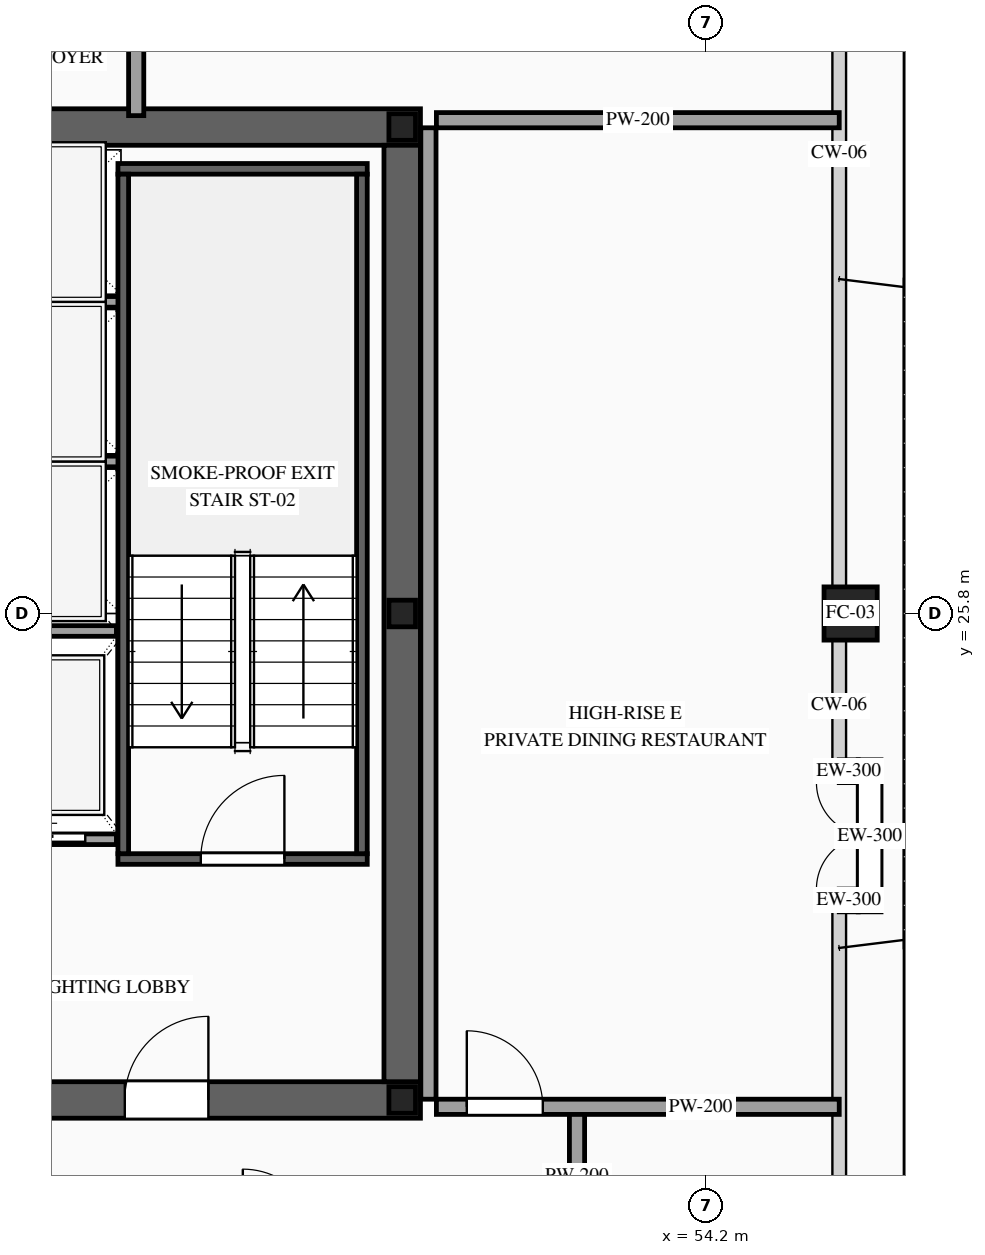
"""IFC4 building model, lengths in metres.
Left out: names, types, materials, properties, quantities, classifications, styles, units other than length and angle.
Written with IfcOpenShell. Run it as: python <this file> out.ifc"""

import sys

from ifc_helpers import new_model, si_unit, direction, frame, frame_2d, origin, origin_2d, place, context, subcontext, project, spatial, rectangle, hollow_rectangle, i_section, extrude, source, transform, mapped, element, fill, save


model = new_model("IFC4")
c1 = context("Model", 3, precision=1e-05, world=origin(), true_north=direction((0.0, 1.0)))
c2 = subcontext(c1, "Body", "Model", "MODEL_VIEW")
j1 = project(units=[si_unit("LENGTHUNIT", "METRE"), si_unit("PLANEANGLEUNIT", "RADIAN")], contexts=[c1])
p1 = place(None, origin())
s1 = spatial("IfcSite", under=j1, at=p1, CompositionType="ELEMENT")
p2 = place(p1, origin())
s2 = spatial("IfcBuilding", under=s1, at=p2, CompositionType="ELEMENT")
p3 = place(p2, frame((0.0, 0.0, 335.7)))
s3 = spatial("IfcBuildingStorey", under=s2, at=p3, CompositionType="ELEMENT", Elevation=335.7)
p4 = place(p3, frame((23.56, 19.4, 0.0), z_axis=(0.0, 0.0, 1.0), x_axis=(1.0, 0.0, 0.0)))
e1 = element("IfcWall", 1, at=p4, inside=s3, PredefinedType="SHEAR", context=c2, shape_type="SweptSolid", body=[
    extrude(rectangle(XDim=26.88, YDim=0.48, at=frame_2d((13.44, 0.0))), origin(), (0.0, 0.0, 1.0), 3.5),
])
p5 = place(p4, frame((1.89, 0.0, 0.0)))
e2 = element("IfcOpeningElement", 2, at=p5, cuts=e1, PredefinedType="OPENING", context=c2, shape_type="SweptSolid", body=[
    extrude(rectangle(XDim=1.1, YDim=2.2, at=frame_2d((0.55, 1.1))), frame((0.0, 0.255, 0.0), z_axis=(0.0, -1.0, 0.0), x_axis=(1.0, 0.0, 0.0)), (0.0, 0.0, 1.0), 0.51),
])
p6 = place(p4, frame((9.79, 0.0, 0.0)))
e3 = element("IfcOpeningElement", 3, at=p6, cuts=e1, PredefinedType="OPENING", context=c2, shape_type="SweptSolid", body=[
    extrude(rectangle(XDim=1.1, YDim=2.2, at=frame_2d((0.55, 1.1))), frame((0.0, 0.255, 0.0), z_axis=(0.0, -1.0, 0.0), x_axis=(1.0, 0.0, 0.0)), (0.0, 0.0, 1.0), 0.51),
])
p7 = place(p4, frame((22.99, 0.0, 0.0)))
e4 = element("IfcOpeningElement", 4, at=p7, cuts=e1, PredefinedType="OPENING", context=c2, shape_type="SweptSolid", body=[
    extrude(rectangle(XDim=1.1, YDim=2.2, at=frame_2d((0.55, 1.1))), frame((0.0, 0.255, 0.0), z_axis=(0.0, -1.0, 0.0), x_axis=(1.0, 0.0, 0.0)), (0.0, 0.0, 1.0), 0.51),
])
p8 = place(p4, frame((19.61, 0.0, 0.0)))
e5 = element("IfcOpeningElement", 5, at=p8, cuts=e1, PredefinedType="OPENING", context=c2, shape_type="SweptSolid", body=[
    extrude(rectangle(XDim=0.9, YDim=2.15, at=frame_2d((0.45, 1.075))), frame((0.0, 0.255, 0.0), z_axis=(0.0, -1.0, 0.0), x_axis=(1.0, 0.0, 0.0)), (0.0, 0.0, 1.0), 0.51),
])
p9 = place(p4, frame((18.17, 0.0, 0.0)))
e6 = element("IfcOpeningElement", 6, at=p9, cuts=e1, PredefinedType="OPENING", context=c2, shape_type="SweptSolid", body=[
    extrude(rectangle(XDim=0.9, YDim=2.15, at=frame_2d((0.45, 1.075))), frame((0.0, 0.255, 0.0), z_axis=(0.0, -1.0, 0.0), x_axis=(1.0, 0.0, 0.0)), (0.0, 0.0, 1.0), 0.51),
])
p10 = place(p3, frame((23.56, 32.2, 0.0), z_axis=(0.0, 0.0, 1.0), x_axis=(1.0, 0.0, 0.0)))
e7 = element("IfcWall", 7, at=p10, inside=s3, PredefinedType="SHEAR", context=c2, shape_type="SweptSolid", body=[
    extrude(rectangle(XDim=26.88, YDim=0.48, at=frame_2d((13.44, 0.0))), origin(), (0.0, 0.0, 1.0), 3.5),
])
p11 = place(p10, frame((4.51, 0.0, 0.0)))
e8 = element("IfcOpeningElement", 8, at=p11, cuts=e7, PredefinedType="OPENING", context=c2, shape_type="SweptSolid", body=[
    extrude(rectangle(XDim=0.9, YDim=2.15, at=frame_2d((0.45, 1.075))), frame((0.0, 0.255, 0.0), z_axis=(0.0, -1.0, 0.0), x_axis=(1.0, 0.0, 0.0)), (0.0, 0.0, 1.0), 0.51),
])
p12 = place(p10, frame((9.79, 0.0, 0.0)))
e9 = element("IfcOpeningElement", 9, at=p12, cuts=e7, PredefinedType="OPENING", context=c2, shape_type="SweptSolid", body=[
    extrude(rectangle(XDim=1.1, YDim=2.2, at=frame_2d((0.55, 1.1))), frame((0.0, 0.255, 0.0), z_axis=(0.0, -1.0, 0.0), x_axis=(1.0, 0.0, 0.0)), (0.0, 0.0, 1.0), 0.51),
])
p13 = place(p10, frame((15.64, 0.0, 0.0)))
e10 = element("IfcOpeningElement", 10, at=p13, cuts=e7, PredefinedType="OPENING", context=c2, shape_type="SweptSolid", body=[
    extrude(rectangle(XDim=1.1, YDim=2.2, at=frame_2d((0.55, 1.1))), frame((0.0, 0.255, 0.0), z_axis=(0.0, -1.0, 0.0), x_axis=(1.0, 0.0, 0.0)), (0.0, 0.0, 1.0), 0.51),
])
p14 = place(p10, frame((18.74, 0.0, 0.0)))
e11 = element("IfcOpeningElement", 11, at=p14, cuts=e7, PredefinedType="OPENING", context=c2, shape_type="SweptSolid", body=[
    extrude(rectangle(XDim=1.1, YDim=2.2, at=frame_2d((0.55, 1.1))), frame((0.0, 0.255, 0.0), z_axis=(0.0, -1.0, 0.0), x_axis=(1.0, 0.0, 0.0)), (0.0, 0.0, 1.0), 0.51),
])
m1 = source(origin(), c2, "Body", "SweptSolid", [
    extrude(rectangle(XDim=12.32, YDim=0.48, at=frame_2d((6.16, 0.0))), origin(), (0.0, 0.0, 1.0), 3.5),
])
p15 = place(p3, frame((50.2, 19.64, 0.0), z_axis=(0.0, 0.0, 1.0), x_axis=(0.0, 1.0, 0.0)))
e12 = element("IfcWall", 12, at=p15, inside=s3, PredefinedType="SHEAR", context=c2, shape_type="MappedRepresentation", body=[
    mapped(m1, transform((0.0, 0.0, 0.0), scale=1.0)),
])
m2 = source(origin(), c2, "Body", "SweptSolid", [
    extrude(i_section(OverallWidth=0.35, OverallDepth=0.35, WebThickness=0.012, FlangeThickness=0.019, at=origin_2d()), origin(), (0.0, 0.0, 1.0), 3.5),
])
for number, where, z_axis, x_axis in (
    (13, (50.2, 19.4, 0.0), (0.0, 0.0, 1.0), (1.0, 0.0, 0.0)),
    (14, (50.2, 25.8, 0.0), (0.0, 0.0, 1.0), (1.0, 0.0, 0.0)),
    (15, (50.2, 32.2, 0.0), (0.0, 0.0, 1.0), (1.0, 0.0, 0.0)),
):
    element("IfcColumn", number, at=place(p3, frame(where, z_axis=z_axis, x_axis=x_axis)), inside=s3, PredefinedType="COLUMN", context=c2, shape_type="MappedRepresentation", body=[
        mapped(m2, transform((0.0, 0.0, 0.0), scale=1.0)),
    ])
m3 = source(origin(), c2, "Body", "SweptSolid", [
    extrude(hollow_rectangle(XDim=0.7, YDim=0.7, WallThickness=0.032, at=origin_2d()), origin(), (0.0, 0.0, 1.0), 3.5),
])
p16 = place(p3, frame((56.1, 25.8, 0.0), z_axis=(0.0, 0.0, 1.0), x_axis=(1.0, 0.0, 0.0)))
e16 = element("IfcColumn", 16, at=p16, inside=s3, PredefinedType="COLUMN", context=c2, shape_type="MappedRepresentation", body=[
    mapped(m3, transform((0.0, 0.0, 0.0), scale=1.0)),
])
p17 = place(p3, frame((56.35, 21.875, 0.0), z_axis=(0.0, 0.0, 1.0), x_axis=(0.0, 1.0, 0.0)))
e17 = element("IfcWall", 17, at=p17, inside=s3, PredefinedType="SOLIDWALL", context=c2, shape_type="SweptSolid", body=[
    extrude(rectangle(XDim=2.0, YDim=0.3, at=frame_2d((1.0, 0.0))), origin(), (0.0, 0.0, 1.0), 2.865),
])
p18 = place(p17, frame((0.3, 0.0, 0.0)))
e18 = element("IfcOpeningElement", 18, at=p18, cuts=e17, PredefinedType="OPENING", context=c2, shape_type="SweptSolid", body=[
    extrude(rectangle(XDim=1.4, YDim=2.3, at=frame_2d((0.7, 1.15))), frame((0.0, 0.165, 0.0), z_axis=(0.0, -1.0, 0.0), x_axis=(1.0, 0.0, 0.0)), (0.0, 0.0, 1.0), 0.33),
])
m4 = source(origin(), c2, "Body", "SweptSolid", [
    extrude(rectangle(XDim=0.25, YDim=0.3, at=frame_2d((0.125, 0.0))), origin(), (0.0, 0.0, 1.0), 3.26),
])
for number, where, z_axis, x_axis in (
    (19, (55.95, 22.025, 0.0), (0.0, 0.0, 1.0), (1.0, 0.0, 0.0)),
    (20, (56.2, 23.725, 0.0), (0.0, 0.0, 1.0), (-1.0, 0.0, 0.0)),
):
    element("IfcWall", number, at=place(p3, frame(where, z_axis=z_axis, x_axis=x_axis)), inside=s3, PredefinedType="SOLIDWALL", context=c2, shape_type="MappedRepresentation", body=[
        mapped(m4, transform((0.0, 0.0, 0.0), scale=1.0)),
    ])
p19 = place(p3, frame((44.52, 22.83, 0.0), z_axis=(0.0, 0.0, 1.0), x_axis=(1.0, 0.0, 0.0)))
e21 = element("IfcWall", 21, at=p19, inside=s3, PredefinedType="SOLIDWALL", context=c2, shape_type="SweptSolid", body=[
    extrude(rectangle(XDim=1.92, YDim=0.14, at=frame_2d((0.96, 0.0))), origin(), (0.0, 0.0, 1.0), 3.26),
])
p20 = place(p19, frame((0.41, 0.0, 0.0)))
e22 = element("IfcOpeningElement", 22, at=p20, cuts=e21, PredefinedType="OPENING", context=c2, shape_type="SweptSolid", body=[
    extrude(rectangle(XDim=1.1, YDim=2.2, at=frame_2d((0.55, 1.1))), frame((0.0, 0.085, 0.0), z_axis=(0.0, -1.0, 0.0), x_axis=(1.0, 0.0, 0.0)), (0.0, 0.0, 1.0), 0.17),
])
m5 = source(origin(), c2, "Body", "SweptSolid", [
    extrude(rectangle(XDim=1.92, YDim=0.14, at=frame_2d((0.96, 0.0))), origin(), (0.0, 0.0, 1.0), 3.26),
])
p21 = place(p3, frame((44.52, 25.57, 0.0), z_axis=(0.0, 0.0, 1.0), x_axis=(1.0, 0.0, 0.0)))
e23 = element("IfcWall", 23, at=p21, inside=s3, PredefinedType="SOLIDWALL", context=c2, shape_type="MappedRepresentation", body=[
    mapped(m5, transform((0.0, 0.0, 0.0), scale=1.0)),
])
m6 = source(origin(), c2, "Body", "SweptSolid", [
    extrude(rectangle(XDim=2.0, YDim=0.14, at=frame_2d((1.0, 0.0))), origin(), (0.0, 0.0, 1.0), 3.26),
])
for number, where, z_axis, x_axis in (
    (24, (44.5, 27.8, 0.0), (0.0, 0.0, 1.0), (1.0, 0.0, 0.0)),
    (25, (44.5, 29.9, 0.0), (0.0, 0.0, 1.0), (1.0, 0.0, 0.0)),
):
    element("IfcWall", number, at=place(p3, frame(where, z_axis=z_axis, x_axis=x_axis)), inside=s3, PredefinedType="SOLIDWALL", context=c2, shape_type="MappedRepresentation", body=[
        mapped(m6, transform((0.0, 0.0, 0.0), scale=1.0)),
    ])
p22 = place(p3, frame((46.46, 22.57, 0.0), z_axis=(0.0, 0.0, 1.0), x_axis=(1.0, 0.0, 0.0)))
e26 = element("IfcWall", 26, at=p22, inside=s3, PredefinedType="SOLIDWALL", context=c2, shape_type="SweptSolid", body=[
    extrude(rectangle(XDim=3.28, YDim=0.14, at=frame_2d((1.64, 0.0))), origin(), (0.0, 0.0, 1.0), 3.26),
])
p23 = place(p22, frame((1.09, 0.0, 0.0)))
e27 = element("IfcOpeningElement", 27, at=p23, cuts=e26, PredefinedType="OPENING", context=c2, shape_type="SweptSolid", body=[
    extrude(rectangle(XDim=1.1, YDim=2.2, at=frame_2d((0.55, 1.1))), frame((0.0, 0.085, 0.0), z_axis=(0.0, -1.0, 0.0), x_axis=(1.0, 0.0, 0.0)), (0.0, 0.0, 1.0), 0.17),
])
m7 = source(origin(), c2, "Body", "SweptSolid", [
    extrude(rectangle(XDim=3.28, YDim=0.14, at=frame_2d((1.64, 0.0))), origin(), (0.0, 0.0, 1.0), 3.26),
])
p24 = place(p3, frame((46.46, 31.65, 0.0), z_axis=(0.0, 0.0, 1.0), x_axis=(1.0, 0.0, 0.0)))
e28 = element("IfcWall", 28, at=p24, inside=s3, PredefinedType="SOLIDWALL", context=c2, shape_type="MappedRepresentation", body=[
    mapped(m7, transform((0.0, 0.0, 0.0), scale=1.0)),
])
m8 = source(origin(), c2, "Body", "SweptSolid", [
    extrude(rectangle(XDim=8.94, YDim=0.14, at=frame_2d((4.47, 0.0))), origin(), (0.0, 0.0, 1.0), 3.26),
])
for number, where, z_axis, x_axis in (
    (29, (46.53, 22.64, 0.0), (0.0, 0.0, 1.0), (0.0, 1.0, 0.0)),
    (30, (49.67, 22.64, 0.0), (0.0, 0.0, 1.0), (0.0, 1.0, 0.0)),
):
    element("IfcWall", number, at=place(p3, frame(where, z_axis=z_axis, x_axis=x_axis)), inside=s3, PredefinedType="SOLIDWALL", context=c2, shape_type="MappedRepresentation", body=[
        mapped(m8, transform((0.0, 0.0, 0.0), scale=1.0)),
    ])
m9 = source(origin(), c2, "Body", "SweptSolid", [
    extrude(rectangle(XDim=1.7, YDim=0.2, at=frame_2d((0.85, 0.0))), origin(), (0.0, 0.0, 1.0), 3.26),
])
for number, where, z_axis, x_axis in (
    (31, (46.7, 32.35, 0.0), (0.0, 0.0, 1.0), (0.0, 1.0, 0.0)),
    (32, (52.5, 17.55, 0.0), (0.0, 0.0, 1.0), (0.0, 1.0, 0.0)),
):
    element("IfcWall", number, at=place(p3, frame(where, z_axis=z_axis, x_axis=x_axis)), inside=s3, PredefinedType="PARTITIONING", context=c2, shape_type="MappedRepresentation", body=[
        mapped(m9, transform((0.0, 0.0, 0.0), scale=1.0)),
    ])
p25 = place(p3, frame((50.65, 19.31, 0.0), z_axis=(0.0, 0.0, 1.0), x_axis=(1.0, 0.0, 0.0)))
e33 = element("IfcWall", 33, at=p25, inside=s3, PredefinedType="PARTITIONING", context=c2, shape_type="SweptSolid", body=[
    extrude(rectangle(XDim=5.3, YDim=0.2, at=frame_2d((2.65, 0.0))), origin(), (0.0, 0.0, 1.0), 2.805),
])
p26 = place(p25, frame((0.4, 0.0, 0.0)))
e34 = element("IfcOpeningElement", 34, at=p26, cuts=e33, PredefinedType="OPENING", context=c2, shape_type="SweptSolid", body=[
    extrude(rectangle(XDim=1.0, YDim=2.2, at=frame_2d((0.5, 1.1))), frame((0.0, 0.115, 0.0), z_axis=(0.0, -1.0, 0.0), x_axis=(1.0, 0.0, 0.0)), (0.0, 0.0, 1.0), 0.23),
])
m10 = source(origin(), c2, "Body", "SweptSolid", [
    extrude(rectangle(XDim=5.3, YDim=0.2, at=frame_2d((2.65, 0.0))), origin(), (0.0, 0.0, 1.0), 2.805),
])
p27 = place(p3, frame((50.65, 32.29, 0.0), z_axis=(0.0, 0.0, 1.0), x_axis=(1.0, 0.0, 0.0)))
e35 = element("IfcWall", 35, at=p27, inside=s3, PredefinedType="PARTITIONING", context=c2, shape_type="MappedRepresentation", body=[
    mapped(m10, transform((0.0, 0.0, 0.0), scale=1.0)),
])
m11 = source(origin(), c2, "Body", "SweptSolid", [
    extrude(rectangle(XDim=12.78, YDim=0.2, at=frame_2d((6.39, 0.0))), origin(), (0.0, 0.0, 1.0), 3.26),
])
p28 = place(p3, frame((50.545, 19.41, 0.0), z_axis=(0.0, 0.0, 1.0), x_axis=(0.0, 1.0, 0.0)))
e36 = element("IfcWall", 36, at=p28, inside=s3, PredefinedType="PARTITIONING", context=c2, shape_type="MappedRepresentation", body=[
    mapped(m11, transform((0.0, 0.0, 0.0), scale=1.0)),
])
m12 = source(origin(), c2, "Body", "SweptSolid", [
    extrude(rectangle(XDim=1.4, YDim=2.3, at=frame_2d((0.7, 1.15))), frame((0.0, 0.025, 0.0), z_axis=(0.0, -1.0, 0.0), x_axis=(1.0, 0.0, 0.0)), (0.0, 0.0, 1.0), 0.05),
])
p29 = place(p18, origin())
e37 = element("IfcDoor", 37, at=p29, inside=s3, OperationType="DOUBLE_DOOR_SINGLE_SWING", PredefinedType="DOOR", context=c2, shape_type="MappedRepresentation", body=[
    mapped(m12, transform((0.0, 0.0, 0.0), scale=1.0)),
])
fill(e18, e37)
m13 = source(origin(), c2, "Body", "SweptSolid", [
    extrude(rectangle(XDim=1.1, YDim=2.2, at=frame_2d((0.55, 1.1))), frame((0.0, 0.025, 0.0), z_axis=(0.0, -1.0, 0.0), x_axis=(1.0, 0.0, 0.0)), (0.0, 0.0, 1.0), 0.05),
])
p30 = place(p20, origin())
e38 = element("IfcDoor", 38, at=p30, inside=s3, OperationType="SLIDING_TO_RIGHT", PredefinedType="DOOR", context=c2, shape_type="MappedRepresentation", body=[
    mapped(m13, transform((0.0, 0.0, 0.0), scale=1.0)),
])
fill(e22, e38)
m14 = source(origin(), c2, "Body", "SweptSolid", [
    extrude(rectangle(XDim=1.1, YDim=2.2, at=frame_2d((0.55, 1.1))), frame((0.0, 0.025, 0.0), z_axis=(0.0, -1.0, 0.0), x_axis=(1.0, 0.0, 0.0)), (0.0, 0.0, 1.0), 0.05),
])
p31 = place(p23, origin())
e39 = element("IfcDoor", 39, at=p31, inside=s3, OperationType="SINGLE_SWING_RIGHT", PredefinedType="DOOR", context=c2, shape_type="MappedRepresentation", body=[
    mapped(m14, transform((0.0, 0.0, 0.0), scale=1.0)),
])
fill(e27, e39)
p32 = place(p7, origin())
e40 = element("IfcDoor", 40, at=p32, inside=s3, OperationType="SINGLE_SWING_RIGHT", PredefinedType="DOOR", context=c2, shape_type="MappedRepresentation", body=[
    mapped(m14, transform((0.0, 0.0, 0.0), scale=1.0)),
])
fill(e4, e40)
m15 = source(origin(), c2, "Body", "SweptSolid", [
    extrude(rectangle(XDim=1.0, YDim=2.2, at=frame_2d((0.5, 1.1))), frame((0.0, 0.025, 0.0), z_axis=(0.0, -1.0, 0.0), x_axis=(1.0, 0.0, 0.0)), (0.0, 0.0, 1.0), 0.05),
])
p33 = place(p26, origin())
e41 = element("IfcDoor", 41, at=p33, inside=s3, OperationType="SINGLE_SWING_LEFT", PredefinedType="DOOR", context=c2, shape_type="MappedRepresentation", body=[
    mapped(m15, transform((0.0, 0.0, 0.0), scale=1.0)),
])
fill(e34, e41)
save(model, sys.argv[1])
